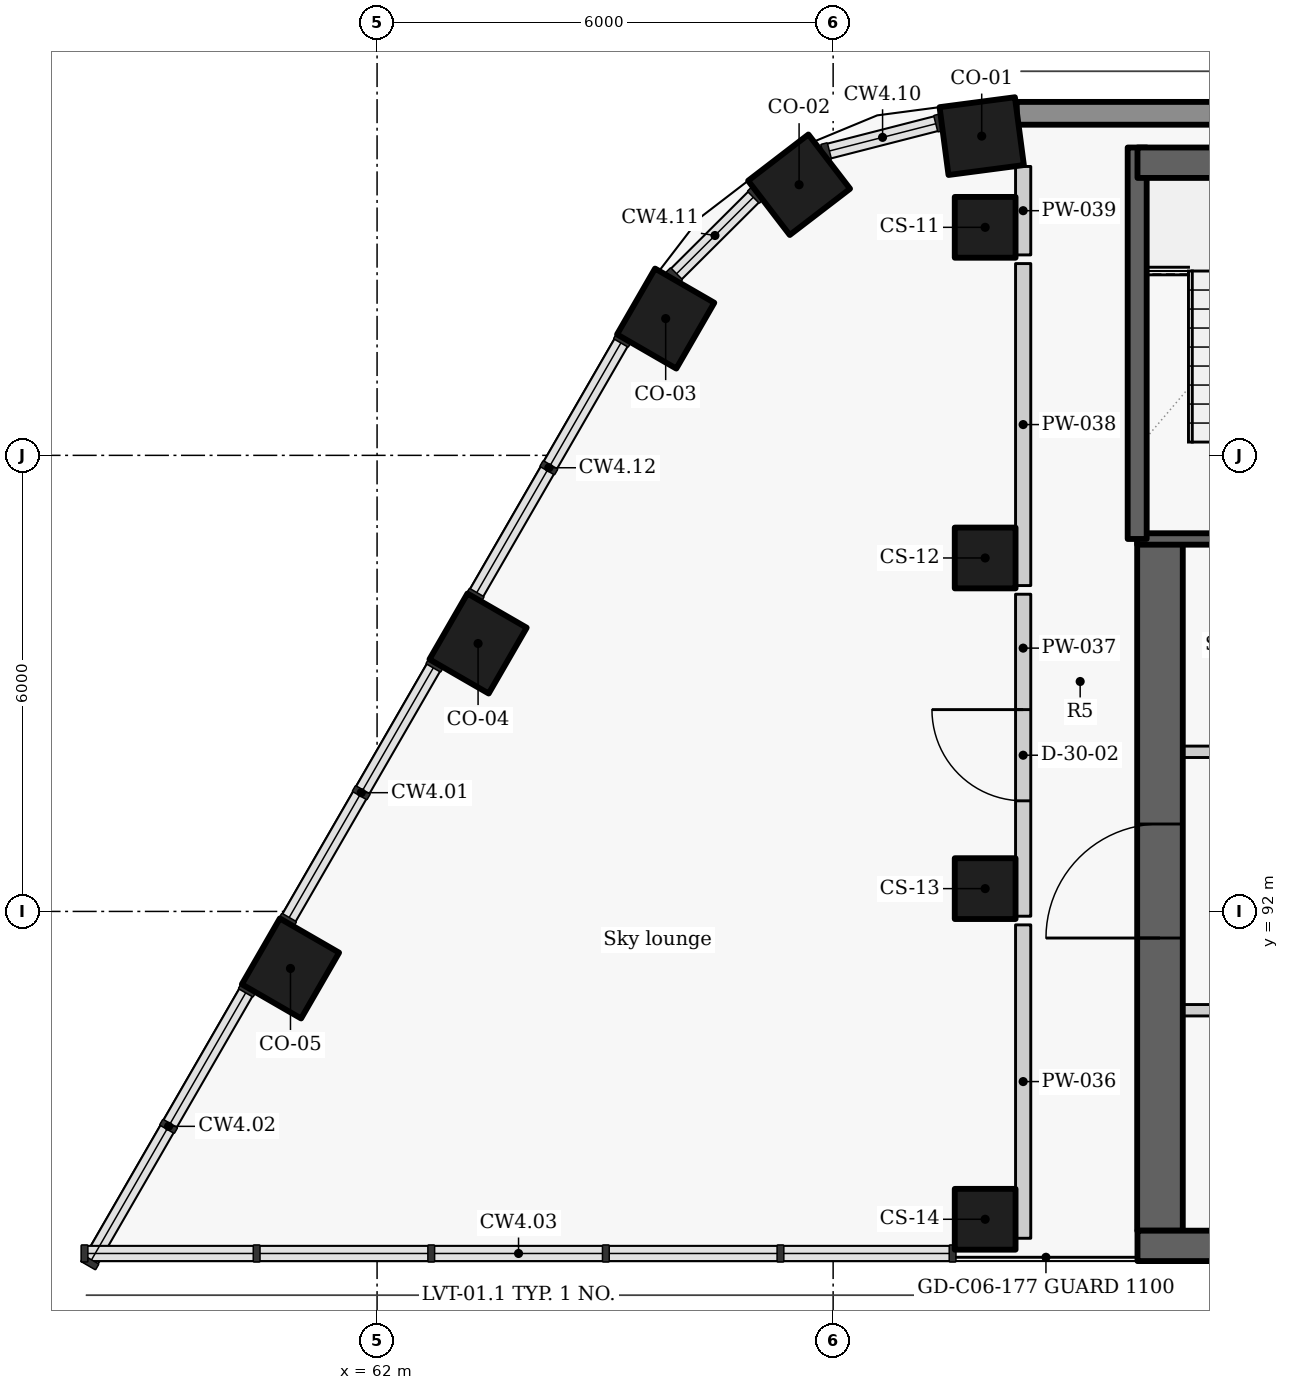
"""IFC4 building model, lengths in metres.
Left out: names, types, materials, properties, quantities, classifications, styles, units other than length and angle.
Written with IfcOpenShell. Run it as: python <this file> out.ifc"""

import sys

from ifc_helpers import new_model, si_unit, direction, frame, frame_2d, origin, origin_2d, place, context, subcontext, project, spatial, rectangle, extrude, element, fill, save


model = new_model("IFC4")
c1 = context("Model", 3, precision=1e-05, world=origin(), true_north=direction((0.0, 1.0)))
c2 = subcontext(c1, "Body", "Model", "MODEL_VIEW")
j1 = project(units=[si_unit("LENGTHUNIT", "METRE"), si_unit("PLANEANGLEUNIT", "RADIAN")], contexts=[c1])
p1 = place(None, origin())
s1 = spatial("IfcSite", under=j1, at=p1, CompositionType="ELEMENT")
p2 = place(p1, origin())
s2 = spatial("IfcBuilding", under=s1, at=p2, CompositionType="ELEMENT")
p3 = place(p2, frame((0.0, 0.0, 290.4)))
s3 = spatial("IfcBuildingStorey", under=s2, at=p3, CompositionType="ELEMENT", Elevation=290.4)
for number, where, z_axis, x_axis in (
    (1, (69.955, 102.2, 0.0), (0.0, 0.0, 1.0), (-0.991, -0.131, 0.0)),
    (2, (67.552, 101.56, 0.0), (0.0, 0.0, 1.0), (-0.793, -0.609, 0.0)),
    (3, (65.797, 99.8, 0.0), (0.0, 0.0, 1.0), (-0.5, -0.866, 0.0)),
    (4, (63.329, 95.525, 0.0), (0.0, 0.0, 1.0), (-0.5, -0.866, 0.0)),
    (5, (60.861, 91.25, 0.0), (0.0, 0.0, 1.0), (-0.5, -0.866, 0.0)),
):
    element("IfcColumn", number, at=place(p3, frame(where, z_axis=z_axis, x_axis=x_axis)), inside=s3, PredefinedType="COLUMN", context=c2, shape_type="SweptSolid", body=[
        extrude(rectangle(XDim=1.0, YDim=0.9, at=origin_2d()), origin(), (0.0, 0.0, 1.0), 3.6),
    ])
for number, where, z_axis, x_axis in (
    (6, (70.0, 101.0, 0.0), (0.0, 0.0, 1.0), (0.0, -1.0, 0.0)),
    (7, (70.0, 96.65, 0.0), (0.0, 0.0, 1.0), (0.0, -1.0, 0.0)),
    (8, (70.0, 92.3, 0.0), (0.0, 0.0, 1.0), (0.0, -1.0, 0.0)),
    (9, (70.0, 87.95, 0.0), (0.0, 0.0, 1.0), (0.0, -1.0, 0.0)),
):
    element("IfcColumn", number, at=place(p3, frame(where, z_axis=z_axis, x_axis=x_axis)), inside=s3, PredefinedType="COLUMN", context=c2, shape_type="SweptSolid", body=[
        extrude(rectangle(XDim=0.8, YDim=0.8, at=origin_2d()), origin(), (0.0, 0.0, 1.0), 3.6),
    ])
p4 = place(p3, frame((89.549, 102.5, 0.0), z_axis=(0.0, 0.0, 1.0), x_axis=(-1.0, 0.0, 0.0)))
e10 = element("IfcWall", 10, at=p4, inside=s3, PredefinedType="SOLIDWALL", context=c2, shape_type="SweptSolid", body=[
    extrude(rectangle(XDim=19.134, YDim=0.3, at=frame_2d((9.567, 0.0))), origin(), (0.0, 0.0, 1.0), 2.725),
])
p5 = place(p3, frame((85.4, 90.7, 0.0), z_axis=(0.0, 0.0, 1.0), x_axis=(-1.0, 0.0, 0.0)))
e11 = element("IfcWall", 11, at=p5, inside=s3, PredefinedType="PARTITIONING", context=c2, shape_type="SweptSolid", body=[
    extrude(rectangle(XDim=13.4, YDim=0.15, at=frame_2d((6.7, 0.0))), origin(), (0.0, 0.0, 1.0), 3.325),
])
p6 = place(p5, frame((11.325, 0.0, 0.0)))
e12 = element("IfcOpeningElement", 12, at=p6, cuts=e11, PredefinedType="OPENING", context=c2, shape_type="SweptSolid", body=[
    extrude(rectangle(XDim=0.9, YDim=2.1, at=frame_2d((0.45, 1.05))), frame((0.0, 0.085, 0.0), z_axis=(0.0, -1.0, 0.0), x_axis=(1.0, 0.0, 0.0)), (0.0, 0.0, 1.0), 0.17),
])
p7 = place(p5, frame((9.0, 0.0, 0.0)))
e13 = element("IfcOpeningElement", 13, at=p7, cuts=e11, PredefinedType="OPENING", context=c2, shape_type="SweptSolid", body=[
    extrude(rectangle(XDim=0.9, YDim=2.1, at=frame_2d((0.45, 1.05))), frame((0.0, 0.085, 0.0), z_axis=(0.0, -1.0, 0.0), x_axis=(1.0, 0.0, 0.0)), (0.0, 0.0, 1.0), 0.17),
])
p8 = place(p5, frame((6.3, 0.0, 0.0)))
e14 = element("IfcOpeningElement", 14, at=p8, cuts=e11, PredefinedType="OPENING", context=c2, shape_type="SweptSolid", body=[
    extrude(rectangle(XDim=0.9, YDim=2.1, at=frame_2d((0.45, 1.05))), frame((0.0, 0.085, 0.0), z_axis=(0.0, -1.0, 0.0), x_axis=(1.0, 0.0, 0.0)), (0.0, 0.0, 1.0), 0.17),
])
p9 = place(p5, frame((3.6, 0.0, 0.0)))
e15 = element("IfcOpeningElement", 15, at=p9, cuts=e11, PredefinedType="OPENING", context=c2, shape_type="SweptSolid", body=[
    extrude(rectangle(XDim=0.9, YDim=2.1, at=frame_2d((0.45, 1.05))), frame((0.0, 0.085, 0.0), z_axis=(0.0, -1.0, 0.0), x_axis=(1.0, 0.0, 0.0)), (0.0, 0.0, 1.0), 0.17),
])
p10 = place(p5, frame((0.9, 0.0, 0.0)))
e16 = element("IfcOpeningElement", 16, at=p10, cuts=e11, PredefinedType="OPENING", context=c2, shape_type="SweptSolid", body=[
    extrude(rectangle(XDim=0.9, YDim=2.1, at=frame_2d((0.45, 1.05))), frame((0.0, 0.085, 0.0), z_axis=(0.0, -1.0, 0.0), x_axis=(1.0, 0.0, 0.0)), (0.0, 0.0, 1.0), 0.17),
])
p11 = place(p3, frame((72.3, 87.8, -0.275), z_axis=(0.0, 0.0, 1.0), x_axis=(0.0, 1.0, 0.0)))
e17 = element("IfcWall", 17, at=p11, inside=s3, PredefinedType="SHEAR", context=c2, shape_type="SweptSolid", body=[
    extrude(rectangle(XDim=9.1, YDim=0.6, at=frame_2d((4.55, 0.0))), origin(), (0.0, 0.0, 1.0), 3.6),
])
p12 = place(p11, frame((3.85, 0.0, 0.275)))
e18 = element("IfcOpeningElement", 18, at=p12, cuts=e17, PredefinedType="OPENING", context=c2, shape_type="SweptSolid", body=[
    extrude(rectangle(XDim=1.5, YDim=2.1, at=frame_2d((0.75, 1.05))), frame((0.0, 0.31, 0.0), z_axis=(0.0, -1.0, 0.0), x_axis=(1.0, 0.0, 0.0)), (0.0, 0.0, 1.0), 0.62),
])
p13 = place(p3, frame((72.0, 94.1, 0.0), z_axis=(0.0, 0.0, 1.0), x_axis=(1.0, 0.0, 0.0)))
e19 = element("IfcWall", 19, at=p13, inside=s3, PredefinedType="PARTITIONING", context=c2, shape_type="SweptSolid", body=[
    extrude(rectangle(XDim=10.703, YDim=0.15, at=frame_2d((5.352, 0.0))), origin(), (0.0, 0.0, 1.0), 3.325),
])
p14 = place(p13, frame((1.075, 0.0, 0.0)))
e20 = element("IfcOpeningElement", 20, at=p14, cuts=e19, PredefinedType="OPENING", context=c2, shape_type="SweptSolid", body=[
    extrude(rectangle(XDim=1.1, YDim=2.1, at=frame_2d((0.55, 1.05))), frame((0.0, 0.085, 0.0), z_axis=(0.0, -1.0, 0.0), x_axis=(1.0, 0.0, 0.0)), (0.0, 0.0, 1.0), 0.17),
])
p15 = place(p13, frame((2.825, 0.0, 0.0)))
e21 = element("IfcOpeningElement", 21, at=p15, cuts=e19, PredefinedType="OPENING", context=c2, shape_type="SweptSolid", body=[
    extrude(rectangle(XDim=0.9, YDim=2.1, at=frame_2d((0.45, 1.05))), frame((0.0, 0.085, 0.0), z_axis=(0.0, -1.0, 0.0), x_axis=(1.0, 0.0, 0.0)), (0.0, 0.0, 1.0), 0.17),
])
p16 = place(p13, frame((4.175, 0.0, 0.0)))
e22 = element("IfcOpeningElement", 22, at=p16, cuts=e19, PredefinedType="OPENING", context=c2, shape_type="SweptSolid", body=[
    extrude(rectangle(XDim=0.9, YDim=2.1, at=frame_2d((0.45, 1.05))), frame((0.0, 0.085, 0.0), z_axis=(0.0, -1.0, 0.0), x_axis=(1.0, 0.0, 0.0)), (0.0, 0.0, 1.0), 0.17),
])
p17 = place(p13, frame((6.05, 0.0, 0.0)))
e23 = element("IfcOpeningElement", 23, at=p17, cuts=e19, PredefinedType="OPENING", context=c2, shape_type="SweptSolid", body=[
    extrude(rectangle(XDim=1.2, YDim=2.1, at=frame_2d((0.6, 1.05))), frame((0.0, 0.085, 0.0), z_axis=(0.0, -1.0, 0.0), x_axis=(1.0, 0.0, 0.0)), (0.0, 0.0, 1.0), 0.17),
])
p18 = place(p13, frame((8.225, 0.0, 0.0)))
e24 = element("IfcOpeningElement", 24, at=p18, cuts=e19, PredefinedType="OPENING", context=c2, shape_type="SweptSolid", body=[
    extrude(rectangle(XDim=0.9, YDim=2.1, at=frame_2d((0.45, 1.05))), frame((0.0, 0.085, 0.0), z_axis=(0.0, -1.0, 0.0), x_axis=(1.0, 0.0, 0.0)), (0.0, 0.0, 1.0), 0.17),
])
p19 = place(p13, frame((9.575, 0.0, 0.0)))
e25 = element("IfcOpeningElement", 25, at=p19, cuts=e19, PredefinedType="OPENING", context=c2, shape_type="SweptSolid", body=[
    extrude(rectangle(XDim=0.9, YDim=2.1, at=frame_2d((0.45, 1.05))), frame((0.0, 0.085, 0.0), z_axis=(0.0, -1.0, 0.0), x_axis=(1.0, 0.0, 0.0)), (0.0, 0.0, 1.0), 0.17),
])
p20 = place(p3, frame((74.6, 96.9, -0.275), z_axis=(0.0, 0.0, 1.0), x_axis=(-1.0, 0.0, 0.0)))
e26 = element("IfcWall", 26, at=p20, inside=s3, PredefinedType="SHEAR", context=c2, shape_type="SweptSolid", body=[
    extrude(rectangle(XDim=2.6, YDim=0.15, at=frame_2d((1.3, 0.0))), origin(), (0.0, 0.0, 1.0), 3.6),
])
p21 = place(p20, frame((0.37, 0.0, 0.275)))
e27 = element("IfcOpeningElement", 27, at=p21, cuts=e26, PredefinedType="OPENING", context=c2, shape_type="SweptSolid", body=[
    extrude(rectangle(XDim=1.1, YDim=2.1, at=frame_2d((0.55, 1.05))), frame((0.0, 0.085, 0.0), z_axis=(0.0, -1.0, 0.0), x_axis=(1.0, 0.0, 0.0)), (0.0, 0.0, 1.0), 0.17),
])
p22 = place(p3, frame((72.0, 96.9, -0.275), z_axis=(0.0, 0.0, 1.0), x_axis=(0.0, 1.0, 0.0)))
e28 = element("IfcWall", 28, at=p22, inside=s3, PredefinedType="SHEAR", context=c2, shape_type="SweptSolid", body=[
    extrude(rectangle(XDim=5.15, YDim=0.25, at=frame_2d((2.575, 0.0))), origin(), (0.0, 0.0, 1.0), 3.6),
])
p23 = place(p3, frame((70.5, 87.7, 0.0), z_axis=(0.0, 0.0, 1.0), x_axis=(0.0, 1.0, 0.0)))
e29 = element("IfcWall", 29, at=p23, inside=s3, PredefinedType="PARTITIONING", context=c2, shape_type="SweptSolid", body=[
    extrude(rectangle(XDim=4.123, YDim=0.2, at=frame_2d((2.062, 0.0))), origin(), (0.0, 0.0, 1.0), 3.325),
])
p24 = place(p3, frame((70.5, 91.937, 0.0), z_axis=(0.0, 0.0, 1.0), x_axis=(0.0, 1.0, 0.0)))
e30 = element("IfcWall", 30, at=p24, inside=s3, PredefinedType="PARTITIONING", context=c2, shape_type="SweptSolid", body=[
    extrude(rectangle(XDim=4.236, YDim=0.2, at=frame_2d((2.118, 0.0))), origin(), (0.0, 0.0, 1.0), 3.325),
])
p25 = place(p24, frame((1.518, 0.0, 0.0)))
e31 = element("IfcOpeningElement", 31, at=p25, cuts=e30, PredefinedType="OPENING", context=c2, shape_type="SweptSolid", body=[
    extrude(rectangle(XDim=1.2, YDim=2.1, at=frame_2d((0.6, 1.05))), frame((0.0, 0.11, 0.0), z_axis=(0.0, -1.0, 0.0), x_axis=(1.0, 0.0, 0.0)), (0.0, 0.0, 1.0), 0.22),
])
p26 = place(p3, frame((70.5, 96.287, 0.0), z_axis=(0.0, 0.0, 1.0), x_axis=(0.0, 1.0, 0.0)))
e32 = element("IfcWall", 32, at=p26, inside=s3, PredefinedType="PARTITIONING", context=c2, shape_type="SweptSolid", body=[
    extrude(rectangle(XDim=4.236, YDim=0.2, at=frame_2d((2.118, 0.0))), origin(), (0.0, 0.0, 1.0), 3.325),
])
p27 = place(p3, frame((70.5, 100.637, 0.0), z_axis=(0.0, 0.0, 1.0), x_axis=(0.0, 1.0, 0.0)))
e33 = element("IfcWall", 33, at=p27, inside=s3, PredefinedType="PARTITIONING", context=c2, shape_type="SweptSolid", body=[
    extrude(rectangle(XDim=1.164, YDim=0.2, at=frame_2d((0.582, 0.0))), origin(), (0.0, 0.0, 1.0), 3.325),
])
p28 = place(p3, frame((72.004, 87.6, -0.275), z_axis=(0.0, 0.0, 1.0), x_axis=(1.0, 0.0, 0.0)))
e34 = element("IfcWall", 34, at=p28, inside=s3, PredefinedType="SHEAR", context=c2, shape_type="SweptSolid", body=[
    extrude(rectangle(XDim=13.396, YDim=0.4, at=frame_2d((6.698, 0.0))), origin(), (0.0, 0.0, 1.0), 3.6),
])
p29 = place(p3, frame((72.004, 101.85, -0.275), z_axis=(0.0, 0.0, 1.0), x_axis=(1.0, 0.0, 0.0)))
e35 = element("IfcWall", 35, at=p29, inside=s3, PredefinedType="SHEAR", context=c2, shape_type="SweptSolid", body=[
    extrude(rectangle(XDim=15.992, YDim=0.4, at=frame_2d((7.996, 0.0))), origin(), (0.0, 0.0, 1.0), 3.6),
])
p30 = place(p25, origin())
e36 = element("IfcDoor", 36, at=p30, inside=s3, OperationType="SINGLE_SWING_RIGHT", PredefinedType="DOOR", context=c2, shape_type="SweptSolid", body=[
    extrude(rectangle(XDim=1.2, YDim=2.1, at=frame_2d((0.6, 1.05))), frame((0.0, 0.025, 0.0), z_axis=(0.0, -1.0, 0.0), x_axis=(1.0, 0.0, 0.0)), (0.0, 0.0, 1.0), 0.05),
])
fill(e31, e36)
p31 = place(p12, origin())
e37 = element("IfcDoor", 37, at=p31, inside=s3, OperationType="DOUBLE_DOOR_SINGLE_SWING", PredefinedType="DOOR", context=c2, shape_type="SweptSolid", body=[
    extrude(rectangle(XDim=1.5, YDim=2.1, at=frame_2d((0.75, 1.05))), frame((0.0, 0.025, 0.0), z_axis=(0.0, -1.0, 0.0), x_axis=(1.0, 0.0, 0.0)), (0.0, 0.0, 1.0), 0.05),
])
fill(e18, e37)
save(model, sys.argv[1])
